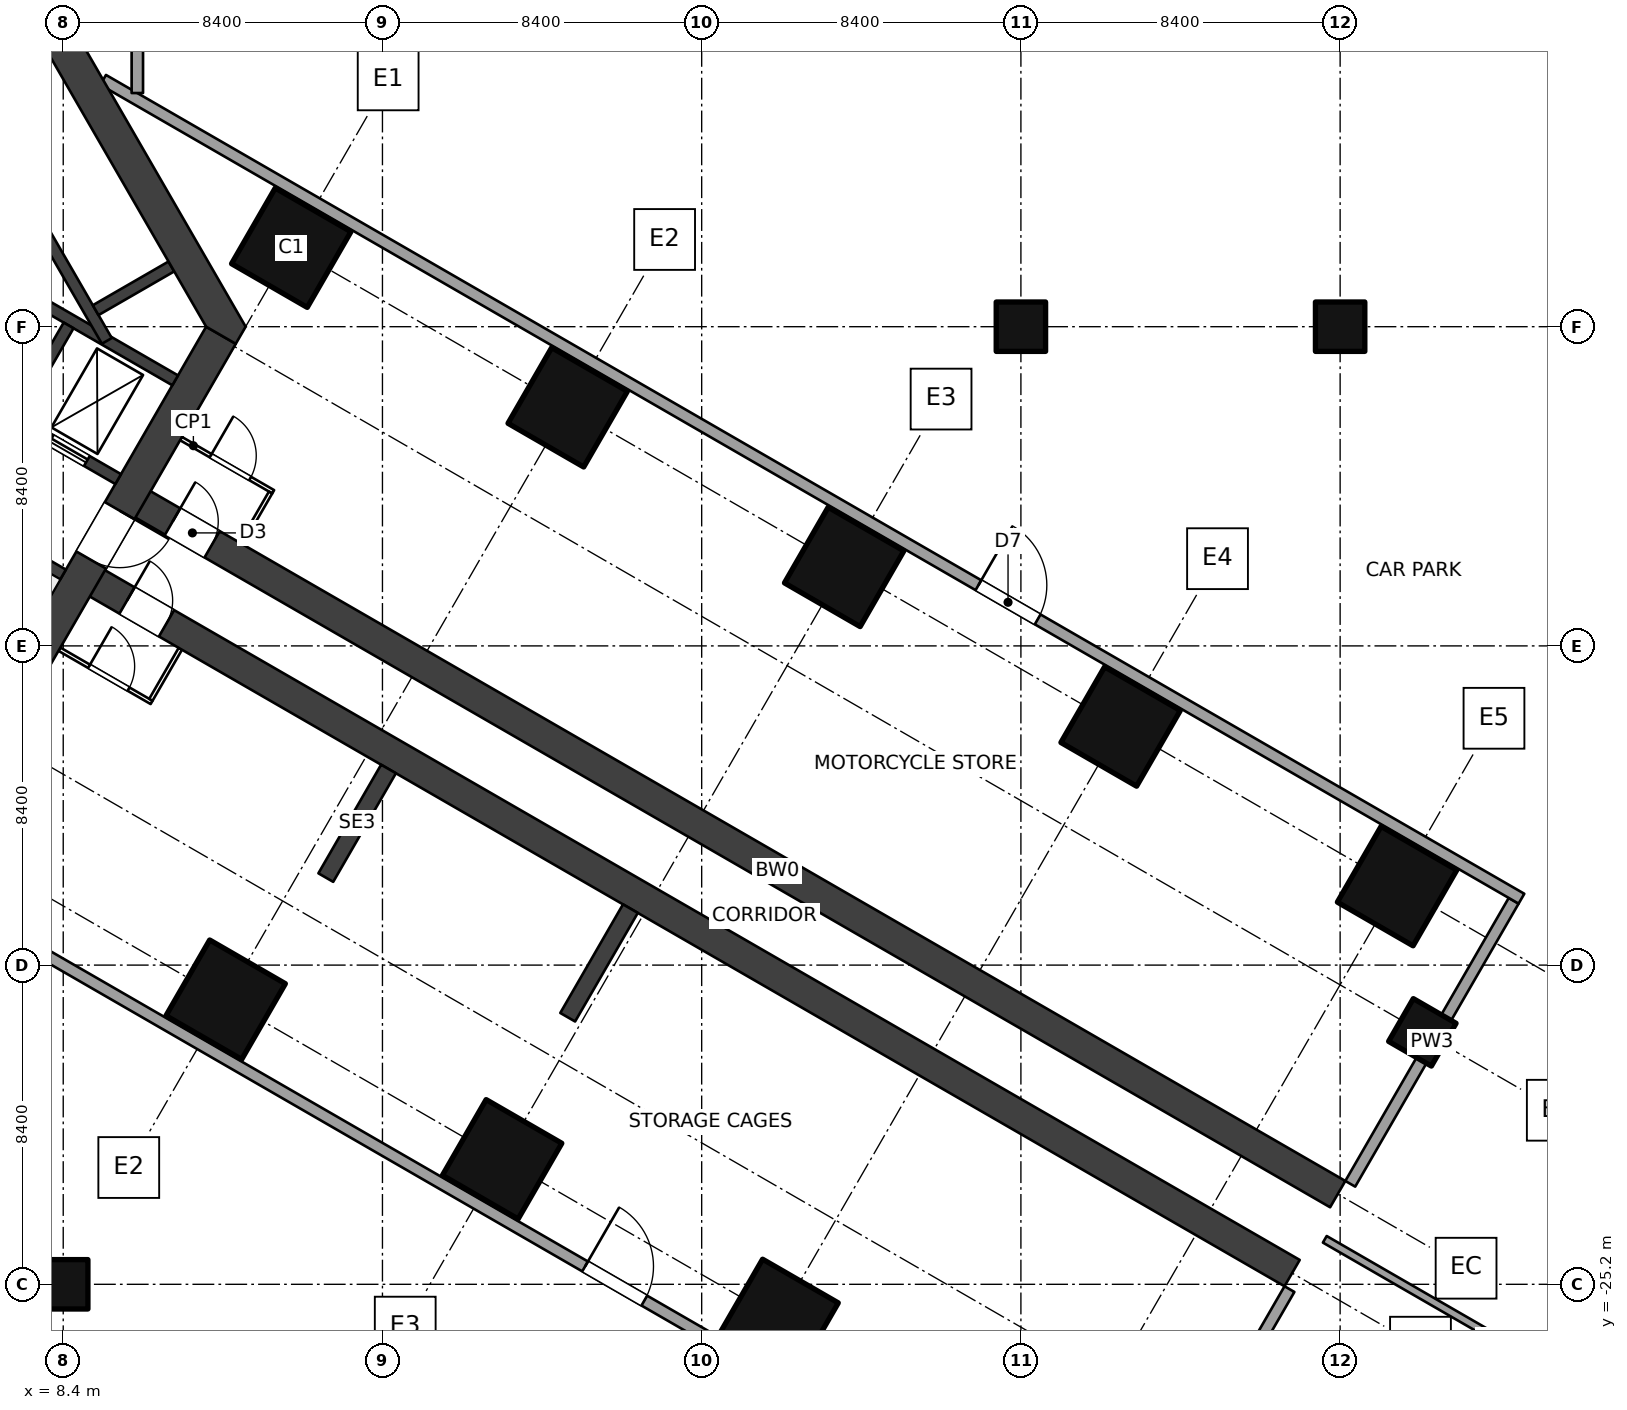
"""IFC4 building model, lengths in metres.
Left out: names, types, materials, properties, quantities, classifications, styles, units other than length and angle.
Written with IfcOpenShell. Run it as: python <this file> out.ifc"""

import sys

from ifc_helpers import new_model, si_unit, direction, frame, frame_2d, origin, origin_2d, place, context, subcontext, project, spatial, polyline, rectangle, outline, extrude, element, fill, save


model = new_model("IFC4")
c1 = context("Model", 3, precision=1e-05, world=origin(), true_north=direction((0.0, 1.0)))
c2 = subcontext(c1, "Body", "Model", "MODEL_VIEW")
j1 = project(units=[si_unit("LENGTHUNIT", "METRE"), si_unit("PLANEANGLEUNIT", "RADIAN")], contexts=[c1])
p1 = place(None, origin())
s1 = spatial("IfcSite", under=j1, at=p1, CompositionType="ELEMENT")
p2 = place(p1, origin())
s2 = spatial("IfcBuilding", under=s1, at=p2, CompositionType="ELEMENT")
p3 = place(p2, frame((0.0, 0.0, -7.0)))
s3 = spatial("IfcBuildingStorey", under=s2, at=p3, CompositionType="ELEMENT", Elevation=-7.0)
for number, where, z_axis, x_axis in (
    (1, (14.4, 2.078, 0.0), (0.0, 0.0, 1.0), (-0.5, -0.866, 0.0)),
    (2, (21.675, -2.122, 0.0), (0.0, 0.0, 1.0), (-0.5, -0.866, 0.0)),
    (3, (12.675, -17.71, 0.0), (0.0, 0.0, 1.0), (-0.5, -0.866, 0.0)),
    (4, (28.949, -6.322, 0.0), (0.0, 0.0, 1.0), (-0.5, -0.866, 0.0)),
    (5, (19.949, -21.91, 0.0), (0.0, 0.0, 1.0), (-0.5, -0.866, 0.0)),
    (6, (36.224, -10.521, 0.0), (0.0, 0.0, 1.0), (-0.5, -0.866, 0.0)),
    (7, (27.224, -26.11, 0.0), (0.0, 0.0, 1.0), (-0.5, -0.866, 0.0)),
    (8, (43.499, -14.721, 0.0), (0.0, 0.0, 1.0), (-0.5, -0.866, 0.0)),
):
    element("IfcColumn", number, at=place(p3, frame(where, z_axis=z_axis, x_axis=x_axis)), inside=s3, PredefinedType="COLUMN", context=c2, shape_type="SweptSolid", body=[
        extrude(rectangle(XDim=2.3, YDim=2.3, at=origin_2d()), origin(), (0.0, 0.0, 1.0), 3.5),
    ])
for number, where, z_axis, x_axis in (
    (9, (44.164, -18.57, 0.0), (0.0, 0.0, 1.0), (-0.5, -0.866, 0.0)),
    (10, (8.4, -25.2, 0.0), (0.0, 0.0, 1.0), (1.0, 0.0, 0.0)),
    (11, (33.6, 0.0, 0.0), (0.0, 0.0, 1.0), (1.0, 0.0, 0.0)),
    (12, (42.0, 0.0, 0.0), (0.0, 0.0, 1.0), (1.0, 0.0, 0.0)),
):
    element("IfcColumn", number, at=place(p3, frame(where, z_axis=z_axis, x_axis=x_axis)), inside=s3, PredefinedType="COLUMN", context=c2, shape_type="SweptSolid", body=[
        extrude(rectangle(XDim=1.3, YDim=1.3, at=origin_2d()), origin(), (0.0, 0.0, 1.0), 3.5),
    ])
p4 = place(p3, frame((12.551, -0.225, 0.0), z_axis=(0.0, 0.0, 1.0), x_axis=(-0.499997612506, -0.8660267822, 0.0)))
e13 = element("IfcWall", 13, at=p4, inside=s3, PredefinedType="SHEAR", context=c2, shape_type="SweptSolid", body=[
    extrude(rectangle(XDim=12.161, YDim=0.9, at=frame_2d((6.08, 0.0))), origin(), (0.0, 0.0, 1.0), 3.5),
])
p5 = place(p4, frame((5.33, 0.0, 0.0)))
e14 = element("IfcOpeningElement", 14, at=p5, cuts=e13, PredefinedType="OPENING", context=c2, shape_type="SweptSolid", body=[
    extrude(rectangle(XDim=1.5, YDim=2.1, at=frame_2d((0.75, 1.05))), frame((0.0, 0.46, 0.0), z_axis=(0.0, -1.0, 0.0), x_axis=(1.0, 0.0, 0.0)), (0.0, 0.0, 1.0), 0.92),
])
p6 = place(p3, origin())
e15 = element("IfcWall", 15, at=p6, inside=s3, PredefinedType="SHEAR", context=c2, shape_type="SweptSolid", body=[
    extrude(outline(polyline([(13.2, 0.0), (6.6, 11.432), (6.08, 11.432), (6.08, 10.531), (12.161, 0.0), (12.94, -0.45), (13.2, 0.0)])), origin(), (0.0, 0.0, 1.0), 3.5),
])
p7 = place(p3, frame((2.419, -3.071, 0.0), z_axis=(0.0, 0.0, 1.0), x_axis=(0.86602711848, -0.499997030048, 0.0)))
e16 = element("IfcWall", 16, at=p7, inside=s3, PredefinedType="SHEAR", context=c2, shape_type="SweptSolid", body=[
    extrude(rectangle(XDim=6.901, YDim=0.3, at=frame_2d((3.451, 0.0))), origin(), (0.0, 0.0, 1.0), 3.5),
])
p8 = place(p7, frame((0.25, 0.0, 0.0)))
e17 = element("IfcOpeningElement", 17, at=p8, cuts=e16, PredefinedType="OPENING", context=c2, shape_type="SweptSolid", body=[
    extrude(rectangle(XDim=1.0, YDim=2.1, at=frame_2d((0.5, 1.05))), frame((0.0, 0.16, 0.0), z_axis=(0.0, -1.0, 0.0), x_axis=(1.0, 0.0, 0.0)), (0.0, 0.0, 1.0), 0.32),
])
p9 = place(p3, frame((3.869, -0.559, 0.0), z_axis=(0.0, 0.0, 1.0), x_axis=(0.86602711848, -0.499997030048, 0.0)))
e18 = element("IfcWall", 18, at=p9, inside=s3, PredefinedType="SHEAR", context=c2, shape_type="SweptSolid", body=[
    extrude(rectangle(XDim=6.901, YDim=0.3, at=frame_2d((3.451, 0.0))), origin(), (0.0, 0.0, 1.0), 3.5),
])
p10 = place(p9, frame((4.85, 0.0, 0.0)))
e19 = element("IfcOpeningElement", 19, at=p10, cuts=e18, PredefinedType="OPENING", context=c2, shape_type="SweptSolid", body=[
    extrude(rectangle(XDim=1.1, YDim=2.1, at=frame_2d((0.55, 1.05))), frame((0.0, 0.16, 0.0), z_axis=(0.0, -1.0, 0.0), x_axis=(1.0, 0.0, 0.0)), (0.0, 0.0, 1.0), 0.32),
])
p11 = place(p3, frame((5.369, 2.039, 0.0), z_axis=(0.0, 0.0, 1.0), x_axis=(0.86602711848, -0.499997030048, 0.0)))
e20 = element("IfcWall", 20, at=p11, inside=s3, PredefinedType="SHEAR", context=c2, shape_type="SweptSolid", body=[
    extrude(rectangle(XDim=6.901, YDim=0.3, at=frame_2d((3.451, 0.0))), origin(), (0.0, 0.0, 1.0), 3.5),
])
p12 = place(p3, frame((8.541, 0.034, 0.0), z_axis=(0.0, 0.0, 1.0), x_axis=(-0.50000943426, -0.866019956843, 0.0)))
e21 = element("IfcWall", 21, at=p12, inside=s3, PredefinedType="SHEAR", context=c2, shape_type="SweptSolid", body=[
    extrude(rectangle(XDim=2.7, YDim=0.3, at=frame_2d((1.35, 0.0))), origin(), (0.0, 0.0, 1.0), 3.5),
])
p13 = place(p3, frame((4.45, 8.455, 0.0), z_axis=(0.0, 0.0, 1.0), x_axis=(0.500002290144, -0.866024081565, 0.0)))
e22 = element("IfcWall", 22, at=p13, inside=s3, PredefinedType="SHEAR", context=c2, shape_type="SweptSolid", body=[
    extrude(rectangle(XDim=10.195, YDim=0.3, at=frame_2d((5.098, 0.0))), origin(), (0.0, 0.0, 1.0), 3.5),
])
p14 = place(p13, frame((4.648, 0.0, 0.0)))
e23 = element("IfcOpeningElement", 23, at=p14, cuts=e22, PredefinedType="OPENING", context=c2, shape_type="SweptSolid", body=[
    extrude(rectangle(XDim=0.9, YDim=2.1, at=frame_2d((0.45, 1.05))), frame((0.0, 0.16, 0.0), z_axis=(0.0, -1.0, 0.0), x_axis=(1.0, 0.0, 0.0)), (0.0, 0.0, 1.0), 0.32),
])
p15 = place(p3, frame((9.254, 0.435, 0.0), z_axis=(0.0, 0.0, 1.0), x_axis=(0.866007057882, 0.500031774688, 0.0)))
e24 = element("IfcWall", 24, at=p15, inside=s3, PredefinedType="SHEAR", context=c2, shape_type="SweptSolid", body=[
    extrude(rectangle(XDim=2.3, YDim=0.3, at=frame_2d((1.15, 0.0))), origin(), (0.0, 0.0, 1.0), 3.5),
])
p16 = place(p3, frame((10.11, -4.451, 0.0), z_axis=(0.0, 0.0, 1.0), x_axis=(0.866025284237, -0.500000207062, 0.0)))
e25 = element("IfcWall", 25, at=p16, inside=s3, PredefinedType="SHEAR", context=c2, shape_type="SweptSolid", body=[
    extrude(rectangle(XDim=36.75, YDim=0.8, at=frame_2d((18.375, 0.0))), origin(), (0.0, 0.0, 1.0), 3.5),
])
p17 = place(p16, frame((1.35, 0.0, 0.0)))
e26 = element("IfcOpeningElement", 26, at=p17, cuts=e25, PredefinedType="OPENING", context=c2, shape_type="SweptSolid", body=[
    extrude(rectangle(XDim=1.2, YDim=2.1, at=frame_2d((0.6, 1.05))), frame((0.0, 0.41, 0.0), z_axis=(0.0, -1.0, 0.0), x_axis=(1.0, 0.0, 0.0)), (0.0, 0.0, 1.0), 0.82),
])
p18 = place(p3, frame((8.91, -6.53, 0.0), z_axis=(0.0, 0.0, 1.0), x_axis=(0.866025284237, -0.500000207062, 0.0)))
e27 = element("IfcWall", 27, at=p18, inside=s3, PredefinedType="SHEAR", context=c2, shape_type="SweptSolid", body=[
    extrude(rectangle(XDim=36.75, YDim=0.8, at=frame_2d((18.375, 0.0))), origin(), (0.0, 0.0, 1.0), 3.5),
])
p19 = place(p18, frame((1.35, 0.0, 0.0)))
e28 = element("IfcOpeningElement", 28, at=p19, cuts=e27, PredefinedType="OPENING", context=c2, shape_type="SweptSolid", body=[
    extrude(rectangle(XDim=1.2, YDim=2.1, at=frame_2d((0.6, 1.05))), frame((0.0, 0.41, 0.0), z_axis=(0.0, -1.0, 0.0), x_axis=(1.0, 0.0, 0.0)), (0.0, 0.0, 1.0), 0.82),
])
p20 = place(p3, frame((11.5, -2.945, 0.0), z_axis=(0.0, 0.0, 1.0), x_axis=(0.866034573852, -0.49998411664, 0.0)))
e29 = element("IfcWall", 29, at=p20, inside=s3, PredefinedType="PARTITIONING", context=c2, shape_type="SweptSolid", body=[
    extrude(rectangle(XDim=2.8, YDim=0.1, at=frame_2d((1.4, 0.0))), origin(), (0.0, 0.0, 1.0), 3.2),
])
p21 = place(p20, frame((0.9, 0.0, 0.0)))
e30 = element("IfcOpeningElement", 30, at=p21, cuts=e29, PredefinedType="OPENING", context=c2, shape_type="SweptSolid", body=[
    extrude(rectangle(XDim=1.2, YDim=2.1, at=frame_2d((0.6, 1.05))), frame((0.0, 0.06, 0.0), z_axis=(0.0, -1.0, 0.0), x_axis=(1.0, 0.0, 0.0)), (0.0, 0.0, 1.0), 0.12),
])
p22 = place(p3, frame((13.082, -5.705, 0.0), z_axis=(0.0, 0.0, 1.0), x_axis=(0.500086022567, 0.865975732936, 0.0)))
e31 = element("IfcWall", 31, at=p22, inside=s3, PredefinedType="PARTITIONING", context=c2, shape_type="SweptSolid", body=[
    extrude(rectangle(XDim=1.55, YDim=0.1, at=frame_2d((0.775, 0.0))), origin(), (0.0, 0.0, 1.0), 3.2),
])
p23 = place(p3, frame((8.3, -8.487, 0.0), z_axis=(0.0, 0.0, 1.0), x_axis=(0.866034573852, -0.49998411664, 0.0)))
e32 = element("IfcWall", 32, at=p23, inside=s3, PredefinedType="PARTITIONING", context=c2, shape_type="SweptSolid", body=[
    extrude(rectangle(XDim=2.8, YDim=0.1, at=frame_2d((1.4, 0.0))), origin(), (0.0, 0.0, 1.0), 3.2),
])
p24 = place(p23, frame((0.9, 0.0, 0.0)))
e33 = element("IfcOpeningElement", 33, at=p24, cuts=e32, PredefinedType="OPENING", context=c2, shape_type="SweptSolid", body=[
    extrude(rectangle(XDim=1.2, YDim=2.1, at=frame_2d((0.6, 1.05))), frame((0.0, 0.06, 0.0), z_axis=(0.0, -1.0, 0.0), x_axis=(1.0, 0.0, 0.0)), (0.0, 0.0, 1.0), 0.12),
])
p25 = place(p3, frame((11.482, -8.476, 0.0), z_axis=(0.0, 0.0, 1.0), x_axis=(-0.500017819788, -0.86601511528, 0.0)))
e34 = element("IfcWall", 34, at=p25, inside=s3, PredefinedType="PARTITIONING", context=c2, shape_type="SweptSolid", body=[
    extrude(rectangle(XDim=1.55, YDim=0.1, at=frame_2d((0.775, 0.0))), origin(), (0.0, 0.0, 1.0), 3.2),
])
p26 = place(p3, frame((41.596, -24.016, 0.0), z_axis=(0.0, 0.0, 1.0), x_axis=(0.866034858292, -0.499983623955, 0.0)))
e35 = element("IfcWall", 35, at=p26, inside=s3, PredefinedType="SOLIDWALL", context=c2, shape_type="SweptSolid", body=[
    extrude(rectangle(XDim=10.627, YDim=0.2, at=frame_2d((5.313, 0.0))), origin(), (0.0, 0.0, 1.0), 3.2),
])
for number, where, z_axis, x_axis in (
    (36, (42.267, -22.555, 0.0), (0.0, 0.0, 1.0), (0.5, 0.866, 0.0)),
    (37, (40.667, -25.326, 0.0), (0.0, 0.0, 1.0), (-0.5, -0.866, 0.0)),
):
    element("IfcWall", number, at=place(p3, frame(where, z_axis=z_axis, x_axis=x_axis)), inside=s3, PredefinedType="SOLIDWALL", context=c2, shape_type="SweptSolid", body=[
        extrude(rectangle(XDim=8.6, YDim=0.3, at=frame_2d((4.3, 0.0))), origin(), (0.0, 0.0, 1.0), 1.9),
    ])
p27 = place(p3, frame((10.35, 6.149, 0.0), z_axis=(0.0, 0.0, 1.0), x_axis=(0.0, 1.0, 0.0)))
e38 = element("IfcWall", 38, at=p27, inside=s3, PredefinedType="SOLIDWALL", context=c2, shape_type="SweptSolid", body=[
    extrude(rectangle(XDim=41.883, YDim=0.3, at=frame_2d((20.941, 0.0))), origin(), (0.0, 0.0, 1.0), 3.2),
])
p28 = place(p27, frame((25.383, 0.0, 0.0)))
e39 = element("IfcOpeningElement", 39, at=p28, cuts=e38, PredefinedType="OPENING", context=c2, shape_type="SweptSolid", body=[
    extrude(rectangle(XDim=1.8, YDim=2.4, at=frame_2d((0.9, 1.2))), frame((0.0, 0.16, 0.0), z_axis=(0.0, -1.0, 0.0), x_axis=(1.0, 0.0, 0.0)), (0.0, 0.0, 1.0), 0.32),
])
p29 = place(p3, frame((9.45, 6.495, 0.0), z_axis=(0.0, 0.0, 1.0), x_axis=(0.866025301493, -0.500000177174, 0.0)))
e40 = element("IfcWall", 40, at=p29, inside=s3, PredefinedType="SOLIDWALL", context=c2, shape_type="SweptSolid", body=[
    extrude(rectangle(XDim=43.095, YDim=0.3, at=frame_2d((21.548, 0.0))), origin(), (0.0, 0.0, 1.0), 3.2),
])
p30 = place(p29, frame((26.595, 0.0, 0.0)))
e41 = element("IfcOpeningElement", 41, at=p30, cuts=e40, PredefinedType="OPENING", context=c2, shape_type="SweptSolid", body=[
    extrude(rectangle(XDim=1.8, YDim=2.4, at=frame_2d((0.9, 1.2))), frame((0.0, 0.16, 0.0), z_axis=(0.0, -1.0, 0.0), x_axis=(1.0, 0.0, 0.0)), (0.0, 0.0, 1.0), 0.32),
])
p31 = place(p3, frame((-0.9, -11.432, 0.0), z_axis=(0.0, 0.0, 1.0), x_axis=(0.866025301493, -0.500000177174, 0.0)))
e42 = element("IfcWall", 42, at=p31, inside=s3, PredefinedType="SOLIDWALL", context=c2, shape_type="SweptSolid", body=[
    extrude(rectangle(XDim=43.095, YDim=0.3, at=frame_2d((21.548, 0.0))), origin(), (0.0, 0.0, 1.0), 3.2),
])
p32 = place(p31, frame((26.595, 0.0, 0.0)))
e43 = element("IfcOpeningElement", 43, at=p32, cuts=e42, PredefinedType="OPENING", context=c2, shape_type="SweptSolid", body=[
    extrude(rectangle(XDim=1.8, YDim=2.4, at=frame_2d((0.9, 1.2))), frame((0.0, 0.16, 0.0), z_axis=(0.0, -1.0, 0.0), x_axis=(1.0, 0.0, 0.0)), (0.0, 0.0, 1.0), 0.32),
])
for number, where, z_axis, x_axis in (
    (44, (16.959, -11.639, 0.0), (0.0, 0.0, 1.0), (-0.5, -0.866, 0.0)),
    (45, (23.324, -15.314, 0.0), (0.0, 0.0, 1.0), (-0.5, -0.866, 0.0)),
):
    element("IfcWall", number, at=place(p3, frame(where, z_axis=z_axis, x_axis=x_axis)), inside=s3, PredefinedType="SOLIDWALL", context=c2, shape_type="SweptSolid", body=[
        extrude(rectangle(XDim=3.3, YDim=0.45, at=frame_2d((1.65, 0.0))), origin(), (0.0, 0.0, 1.0), 3.5),
    ])
p33 = place(p10, origin())
e46 = element("IfcDoor", 46, at=p33, inside=s3, OperationType="DOUBLE_DOOR_SLIDING", PredefinedType="DOOR", context=c2, shape_type="SweptSolid", body=[
    extrude(rectangle(XDim=1.1, YDim=2.1, at=frame_2d((0.55, 1.05))), frame((0.0, 0.025, 0.0), z_axis=(0.0, -1.0, 0.0), x_axis=(1.0, 0.0, 0.0)), (0.0, 0.0, 1.0), 0.05),
])
fill(e19, e46)
p34 = place(p5, origin())
e47 = element("IfcDoor", 47, at=p34, inside=s3, OperationType="DOUBLE_DOOR_DOUBLE_SWING", PredefinedType="DOOR", context=c2, shape_type="SweptSolid", body=[
    extrude(rectangle(XDim=1.5, YDim=2.1, at=frame_2d((0.75, 1.05))), frame((0.0, 0.025, 0.0), z_axis=(0.0, -1.0, 0.0), x_axis=(1.0, 0.0, 0.0)), (0.0, 0.0, 1.0), 0.05),
])
fill(e14, e47)
p35 = place(p17, origin())
e48 = element("IfcDoor", 48, at=p35, inside=s3, OperationType="DOUBLE_SWING_LEFT", PredefinedType="DOOR", context=c2, shape_type="SweptSolid", body=[
    extrude(rectangle(XDim=1.2, YDim=2.1, at=frame_2d((0.6, 1.05))), frame((0.0, 0.025, 0.0), z_axis=(0.0, -1.0, 0.0), x_axis=(1.0, 0.0, 0.0)), (0.0, 0.0, 1.0), 0.05),
])
fill(e26, e48)
p36 = place(p21, origin())
e49 = element("IfcDoor", 49, at=p36, inside=s3, OperationType="DOUBLE_SWING_LEFT", PredefinedType="DOOR", context=c2, shape_type="SweptSolid", body=[
    extrude(rectangle(XDim=1.2, YDim=2.1, at=frame_2d((0.6, 1.05))), frame((0.0, 0.025, 0.0), z_axis=(0.0, -1.0, 0.0), x_axis=(1.0, 0.0, 0.0)), (0.0, 0.0, 1.0), 0.05),
])
fill(e30, e49)
p37 = place(p19, origin())
e50 = element("IfcDoor", 50, at=p37, inside=s3, OperationType="DOUBLE_SWING_LEFT", PredefinedType="DOOR", context=c2, shape_type="SweptSolid", body=[
    extrude(rectangle(XDim=1.2, YDim=2.1, at=frame_2d((0.6, 1.05))), frame((0.0, 0.025, 0.0), z_axis=(0.0, -1.0, 0.0), x_axis=(1.0, 0.0, 0.0)), (0.0, 0.0, 1.0), 0.05),
])
fill(e28, e50)
p38 = place(p24, origin())
e51 = element("IfcDoor", 51, at=p38, inside=s3, OperationType="DOUBLE_SWING_LEFT", PredefinedType="DOOR", context=c2, shape_type="SweptSolid", body=[
    extrude(rectangle(XDim=1.2, YDim=2.1, at=frame_2d((0.6, 1.05))), frame((0.0, 0.025, 0.0), z_axis=(0.0, -1.0, 0.0), x_axis=(1.0, 0.0, 0.0)), (0.0, 0.0, 1.0), 0.05),
])
fill(e33, e51)
p39 = place(p30, origin())
e52 = element("IfcDoor", 52, at=p39, inside=s3, OperationType="DOUBLE_DOOR_DOUBLE_SWING", PredefinedType="DOOR", context=c2, shape_type="SweptSolid", body=[
    extrude(rectangle(XDim=1.8, YDim=2.4, at=frame_2d((0.9, 1.2))), frame((0.0, 0.025, 0.0), z_axis=(0.0, -1.0, 0.0), x_axis=(1.0, 0.0, 0.0)), (0.0, 0.0, 1.0), 0.05),
])
fill(e41, e52)
p40 = place(p32, origin())
e53 = element("IfcDoor", 53, at=p40, inside=s3, OperationType="DOUBLE_DOOR_DOUBLE_SWING", PredefinedType="DOOR", context=c2, shape_type="SweptSolid", body=[
    extrude(rectangle(XDim=1.8, YDim=2.4, at=frame_2d((0.9, 1.2))), frame((0.0, 0.025, 0.0), z_axis=(0.0, -1.0, 0.0), x_axis=(1.0, 0.0, 0.0)), (0.0, 0.0, 1.0), 0.05),
])
fill(e43, e53)
save(model, sys.argv[1])
